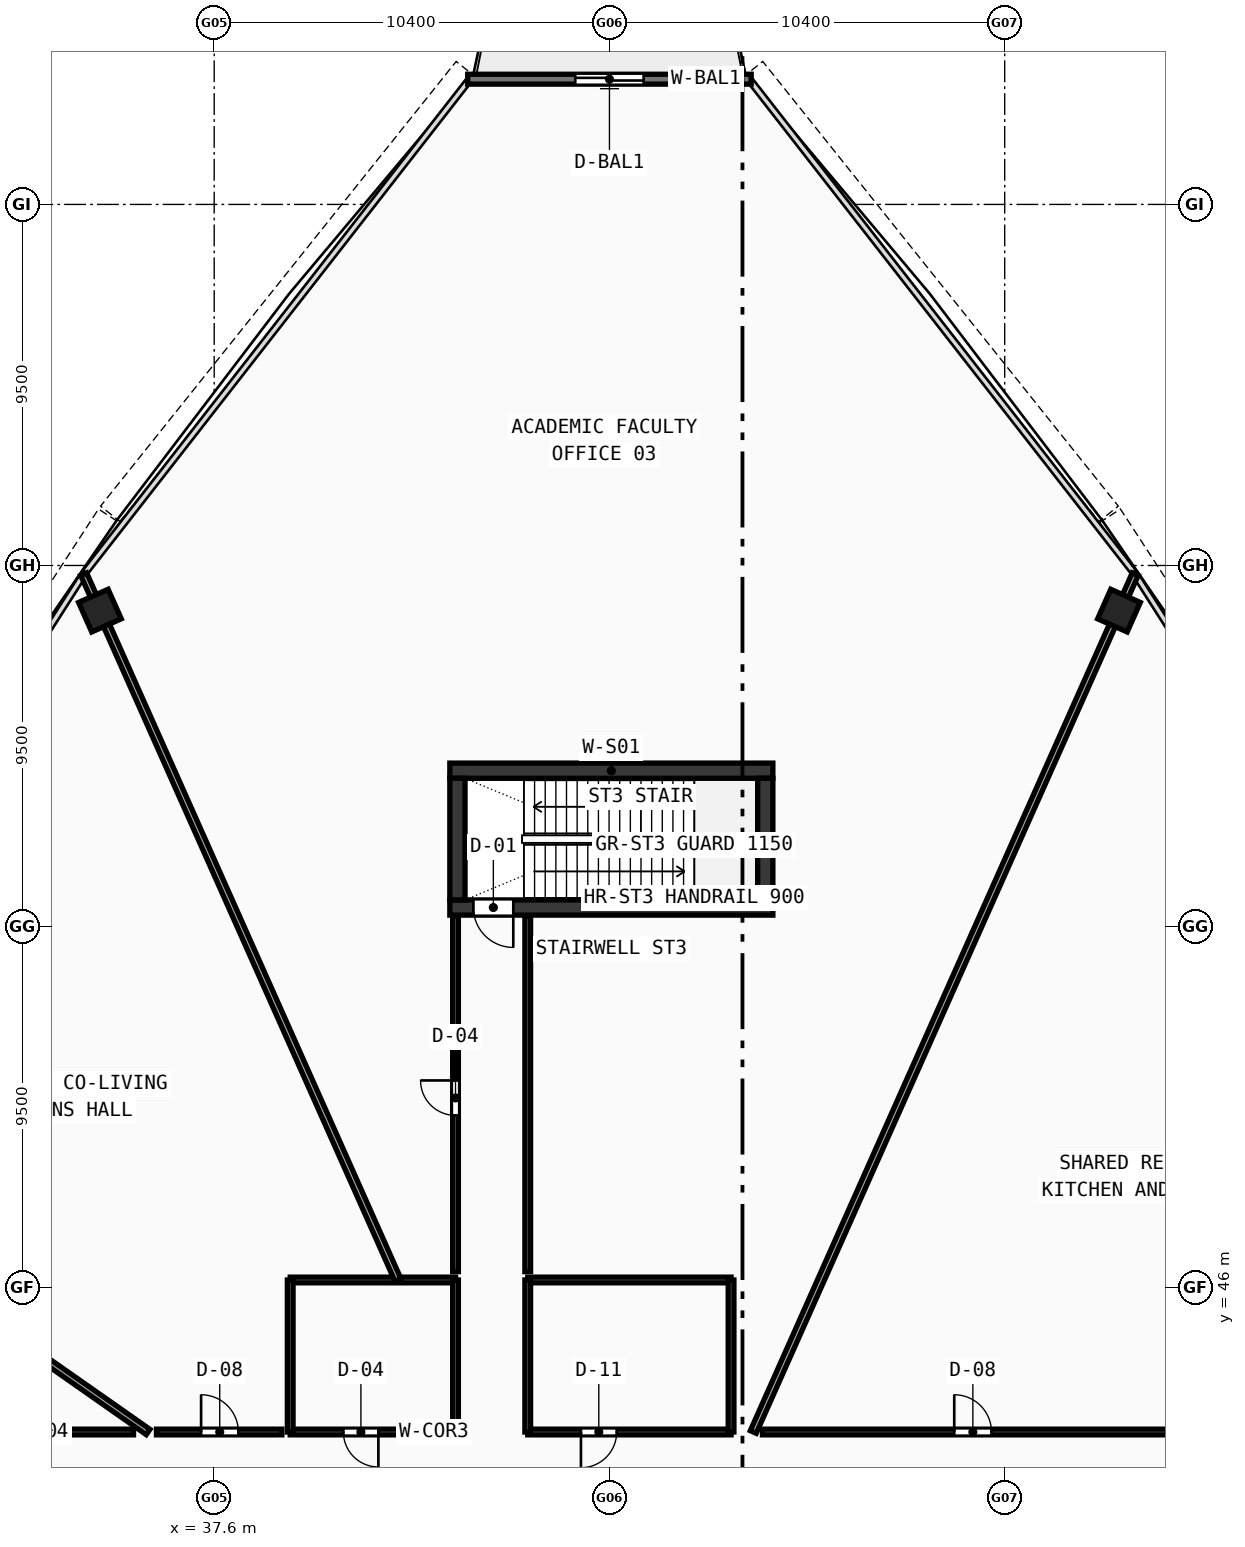
"""IFC4 building model, lengths in metres.
Left out: names, types, materials, properties, quantities, classifications, styles, units other than length and angle.
Written with IfcOpenShell. Run it as: python <this file> out.ifc"""

import sys

from ifc_helpers import new_model, si_unit, direction, frame, frame_2d, origin, origin_with_axes, origin_2d, place, context, subcontext, project, spatial, rectangle, hollow_rectangle, extrude, source, transform, mapped, element, fill, save


model = new_model("IFC4")
c1 = context("Model", 3, precision=1e-05, world=origin(), true_north=direction((0.0, 1.0)))
c2 = subcontext(c1, "Body", "Model", "MODEL_VIEW")
j1 = project(units=[si_unit("LENGTHUNIT", "METRE"), si_unit("PLANEANGLEUNIT", "RADIAN")], contexts=[c1])
p1 = place(None, origin())
s1 = spatial("IfcSite", under=j1, at=p1, CompositionType="ELEMENT")
p2 = place(p1, origin())
s2 = spatial("IfcBuilding", under=s1, at=p2, CompositionType="ELEMENT")
p3 = place(p2, frame((0.0, 0.0, 266.91)))
s3 = spatial("IfcBuildingStorey", under=s2, at=p3, CompositionType="ELEMENT", Elevation=266.91)
p4 = place(p3, frame((43.8, 59.6, 0.0), z_axis=(0.0, 0.0, 1.0), x_axis=(1.0, 0.0, 0.0)))
e1 = element("IfcWall", 1, at=p4, inside=s3, PredefinedType="SHEAR", context=c2, shape_type="SweptSolid", body=[
    extrude(rectangle(XDim=8.5, YDim=0.4, at=frame_2d((4.25, 0.0))), origin(), (0.0, 0.0, 1.0), 5.57),
])
p5 = place(p3, frame((43.8, 56.0, 0.0), z_axis=(0.0, 0.0, 1.0), x_axis=(1.0, 0.0, 0.0)))
e2 = element("IfcWall", 2, at=p5, inside=s3, PredefinedType="SHEAR", context=c2, shape_type="SweptSolid", body=[
    extrude(rectangle(XDim=8.5, YDim=0.4, at=frame_2d((4.25, 0.0))), origin(), (0.0, 0.0, 1.0), 5.57),
])
p6 = place(p5, frame((0.62, 0.0, 0.0)))
e3 = element("IfcOpeningElement", 3, at=p6, cuts=e2, PredefinedType="OPENING", context=c2, shape_type="SweptSolid", body=[
    extrude(rectangle(XDim=1.05, YDim=2.1, at=frame_2d((0.525, 1.05))), frame((0.0, 0.21, 0.0), z_axis=(0.0, -1.0, 0.0), x_axis=(1.0, 0.0, 0.0)), (0.0, 0.0, 1.0), 0.42),
])
for number, where, z_axis, x_axis in (
    (4, (44.0, 56.2, 0.0), (0.0, 0.0, 1.0), (0.0, 1.0, 0.0)),
    (5, (52.1, 56.2, 0.0), (0.0, 0.0, 1.0), (0.0, 1.0, 0.0)),
):
    element("IfcWall", number, at=place(p3, frame(where, z_axis=z_axis, x_axis=x_axis)), inside=s3, PredefinedType="SHEAR", context=c2, shape_type="SweptSolid", body=[
        extrude(rectangle(XDim=3.2, YDim=0.4, at=frame_2d((1.6, 0.0))), origin(), (0.0, 0.0, 1.0), 5.57),
    ])
m1 = source(origin(), c2, "Body", "SweptSolid", [
    extrude(hollow_rectangle(XDim=0.85, YDim=0.85, WallThickness=0.034, at=origin_2d()), origin(), (0.0, 0.0, 1.0), 5.83),
])
for number, where, z_axis, x_axis in (
    (6, (61.407, 63.812, -0.26), (0.0, 0.0, 1.0), (-0.914, 0.407, 0.0)),
    (7, (34.593, 63.812, -0.26), (0.0, 0.0, 1.0), (-0.914, -0.407, 0.0)),
):
    element("IfcColumn", number, at=place(p3, frame(where, z_axis=z_axis, x_axis=x_axis)), inside=s3, PredefinedType="COLUMN", context=c2, shape_type="MappedRepresentation", body=[
        mapped(m1, transform((0.0, 0.0, 0.0), scale=1.0)),
    ])
p7 = place(p3, frame((51.729, 77.795, 0.0), z_axis=(0.0, 0.0, 1.0), x_axis=(-1.0, 0.0, 0.0)))
e8 = element("IfcWall", 8, at=p7, inside=s3, PredefinedType="STANDARD", context=c2, shape_type="SweptSolid", body=[
    extrude(rectangle(XDim=7.458, YDim=0.26, at=frame_2d((3.729, 0.0))), origin(), (0.0, 0.0, 1.0), 5.57),
])
p8 = place(p7, frame((2.829, 0.0, 0.0)))
e9 = element("IfcOpeningElement", 9, at=p8, cuts=e8, PredefinedType="OPENING", context=c2, shape_type="SweptSolid", body=[
    extrude(rectangle(XDim=1.8, YDim=2.15, at=frame_2d((0.9, 1.075))), frame((0.0, 0.14, 0.0), z_axis=(0.0, -1.0, 0.0), x_axis=(1.0, 0.0, 0.0)), (0.0, 0.0, 1.0), 0.28),
])
p9 = place(p3, frame((39.6, 42.2, 0.0), z_axis=(0.0, 0.0, 1.0), x_axis=(1.0, 0.0, 0.0)))
e10 = element("IfcWall", 10, at=p9, inside=s3, PredefinedType="PARTITIONING", context=c2, shape_type="SweptSolid", body=[
    extrude(rectangle(XDim=4.35, YDim=0.15, at=frame_2d((2.175, 0.0))), origin(), (0.0, 0.0, 1.0), 2.22),
])
p10 = place(p9, frame((1.4, 0.0, 0.0)))
e11 = element("IfcOpeningElement", 11, at=p10, cuts=e10, PredefinedType="OPENING", context=c2, shape_type="SweptSolid", body=[
    extrude(rectangle(XDim=0.92, YDim=2.1, at=frame_2d((0.46, 1.05))), frame((0.0, 0.085, 0.0), z_axis=(0.0, -1.0, 0.0), x_axis=(1.0, 0.0, 0.0)), (0.0, 0.0, 1.0), 0.17),
])
p11 = place(p3, frame((39.6, 46.2, 0.0), z_axis=(0.0, 0.0, 1.0), x_axis=(1.0, 0.0, 0.0)))
e12 = element("IfcWall", 12, at=p11, inside=s3, PredefinedType="PARTITIONING", context=c2, shape_type="SweptSolid", body=[
    extrude(rectangle(XDim=4.35, YDim=0.15, at=frame_2d((2.175, 0.0))), origin(), (0.0, 0.0, 1.0), 2.22),
])
p12 = place(p3, frame((39.6, 42.2, 0.0), z_axis=(0.0, 0.0, 1.0), x_axis=(0.0, 1.0, 0.0)))
e13 = element("IfcWall", 13, at=p12, inside=s3, PredefinedType="PARTITIONING", context=c2, shape_type="SweptSolid", body=[
    extrude(rectangle(XDim=4.0, YDim=0.15, at=frame_2d((2.0, 0.0))), origin(), (0.0, 0.0, 1.0), 5.22),
])
p13 = place(p3, frame((43.95, 42.2, 0.0), z_axis=(0.0, 0.0, 1.0), x_axis=(0.0, 1.0, 0.0)))
e14 = element("IfcWall", 14, at=p13, inside=s3, PredefinedType="PARTITIONING", context=c2, shape_type="SweptSolid", body=[
    extrude(rectangle(XDim=4.0, YDim=0.15, at=frame_2d((2.0, 0.0))), origin(), (0.0, 0.0, 1.0), 2.22),
])
p14 = place(p3, frame((45.85, 42.2, 0.0), z_axis=(0.0, 0.0, 1.0), x_axis=(1.0, 0.0, 0.0)))
e15 = element("IfcWall", 15, at=p14, inside=s3, PredefinedType="PARTITIONING", context=c2, shape_type="SweptSolid", body=[
    extrude(rectangle(XDim=5.35, YDim=0.15, at=frame_2d((2.675, 0.0))), origin(), (0.0, 0.0, 1.0), 5.57),
])
p15 = place(p14, frame((1.4, 0.0, 0.0)))
e16 = element("IfcOpeningElement", 16, at=p15, cuts=e15, PredefinedType="OPENING", context=c2, shape_type="SweptSolid", body=[
    extrude(rectangle(XDim=0.94, YDim=2.1, at=frame_2d((0.47, 1.05))), frame((0.0, 0.085, 0.0), z_axis=(0.0, -1.0, 0.0), x_axis=(1.0, 0.0, 0.0)), (0.0, 0.0, 1.0), 0.17),
])
p16 = place(p3, frame((45.85, 46.2, 0.0), z_axis=(0.0, 0.0, 1.0), x_axis=(1.0, 0.0, 0.0)))
e17 = element("IfcWall", 17, at=p16, inside=s3, PredefinedType="PARTITIONING", context=c2, shape_type="SweptSolid", body=[
    extrude(rectangle(XDim=5.35, YDim=0.15, at=frame_2d((2.675, 0.0))), origin(), (0.0, 0.0, 1.0), 5.57),
])
for number, where, z_axis, x_axis in (
    (18, (45.85, 42.2, 0.0), (0.0, 0.0, 1.0), (0.0, 1.0, 0.0)),
    (19, (51.2, 42.2, 0.0), (0.0, 0.0, 1.0), (0.0, 1.0, 0.0)),
):
    element("IfcWall", number, at=place(p3, frame(where, z_axis=z_axis, x_axis=x_axis)), inside=s3, PredefinedType="PARTITIONING", context=c2, shape_type="SweptSolid", body=[
        extrude(rectangle(XDim=4.0, YDim=0.15, at=frame_2d((2.0, 0.0))), origin(), (0.0, 0.0, 1.0), 5.57),
    ])
p17 = place(p3, frame((51.784, 42.2, 0.0), z_axis=(0.0, 0.0, 1.0), x_axis=(0.406737985753, 0.913544859843, 0.0)))
e20 = element("IfcWall", 20, at=p17, inside=s3, PredefinedType="PARTITIONING", context=c2, shape_type="SweptSolid", body=[
    extrude(rectangle(XDim=24.707, YDim=0.17, at=frame_2d((12.354, 0.0))), origin(), (0.0, 0.0, 1.0), 2.22),
])
p18 = place(p3, frame((42.435, 46.2, 0.0), z_axis=(0.0, 0.0, 1.0), x_axis=(-0.406734534197, 0.913546396573, 0.0)))
e21 = element("IfcWall", 21, at=p18, inside=s3, PredefinedType="PARTITIONING", context=c2, shape_type="SweptSolid", body=[
    extrude(rectangle(XDim=20.329, YDim=0.17, at=frame_2d((10.164, 0.0))), origin(), (0.0, 0.0, 1.0), 2.22),
])
p19 = place(p3, frame((35.861, 42.2, 0.0), z_axis=(0.0, 0.0, 1.0), x_axis=(-0.819147381932, 0.57358309483, 0.0)))
e22 = element("IfcWall", 22, at=p19, inside=s3, PredefinedType="PARTITIONING", context=c2, shape_type="SweptSolid", body=[
    extrude(rectangle(XDim=13.297, YDim=0.17, at=frame_2d((6.649, 0.0))), origin(), (0.0, 0.0, 1.0), 4.92),
])
p20 = place(p3, frame((33.15, 42.2, 0.0), z_axis=(0.0, 0.0, 1.0), x_axis=(1.0, 0.0, 0.0)))
e23 = element("IfcWall", 23, at=p20, inside=s3, PredefinedType="PARTITIONING", context=c2, shape_type="SweptSolid", body=[
    extrude(rectangle(XDim=2.327, YDim=0.15, at=frame_2d((1.164, 0.0))), origin(), (0.0, 0.0, 1.0), 5.22),
])
p21 = place(p3, frame((36.081, 42.2, 0.0), z_axis=(0.0, 0.0, 1.0), x_axis=(1.0, 0.0, 0.0)))
e24 = element("IfcWall", 24, at=p21, inside=s3, PredefinedType="PARTITIONING", context=c2, shape_type="SweptSolid", body=[
    extrude(rectangle(XDim=3.299, YDim=0.15, at=frame_2d((1.65, 0.0))), origin(), (0.0, 0.0, 1.0), 2.22),
])
p22 = place(p21, frame((1.175, 0.0, 0.0)))
e25 = element("IfcOpeningElement", 25, at=p22, cuts=e24, PredefinedType="OPENING", context=c2, shape_type="SweptSolid", body=[
    extrude(rectangle(XDim=0.98, YDim=2.12, at=frame_2d((0.49, 1.06))), frame((0.0, 0.085, 0.0), z_axis=(0.0, -1.0, 0.0), x_axis=(1.0, 0.0, 0.0)), (0.0, 0.0, 1.0), 0.17),
])
p23 = place(p3, frame((43.95, 46.42, 0.0), z_axis=(0.0, 0.0, 1.0), x_axis=(0.0, 1.0, 0.0)))
e26 = element("IfcWall", 26, at=p23, inside=s3, PredefinedType="PARTITIONING", context=c2, shape_type="SweptSolid", body=[
    extrude(rectangle(XDim=9.36, YDim=0.15, at=frame_2d((4.68, 0.0))), origin(), (0.0, 0.0, 1.0), 5.22),
])
p24 = place(p23, frame((4.11, 0.0, 0.0)))
e27 = element("IfcOpeningElement", 27, at=p24, cuts=e26, PredefinedType="OPENING", context=c2, shape_type="SweptSolid", body=[
    extrude(rectangle(XDim=0.92, YDim=2.1, at=frame_2d((0.46, 1.05))), frame((0.0, 0.085, 0.0), z_axis=(0.0, -1.0, 0.0), x_axis=(1.0, 0.0, 0.0)), (0.0, 0.0, 1.0), 0.17),
])
p25 = place(p3, frame((45.85, 55.78, 0.0), z_axis=(0.0, 0.0, 1.0), x_axis=(0.0, -1.0, 0.0)))
e28 = element("IfcWall", 28, at=p25, inside=s3, PredefinedType="PARTITIONING", context=c2, shape_type="SweptSolid", body=[
    extrude(rectangle(XDim=9.36, YDim=0.15, at=frame_2d((4.68, 0.0))), origin(), (0.0, 0.0, 1.0), 5.22),
])
p26 = place(p3, frame((52.025, 42.2, 0.0), z_axis=(0.0, 0.0, 1.0), x_axis=(1.0, 0.0, 0.0)))
e29 = element("IfcWall", 29, at=p26, inside=s3, PredefinedType="PARTITIONING", context=c2, shape_type="SweptSolid", body=[
    extrude(rectangle(XDim=10.825, YDim=0.15, at=frame_2d((5.413, 0.0))), origin(), (0.0, 0.0, 1.0), 2.22),
])
p27 = place(p26, frame((5.047, 0.0, 0.0)))
e30 = element("IfcOpeningElement", 30, at=p27, cuts=e29, PredefinedType="OPENING", context=c2, shape_type="SweptSolid", body=[
    extrude(rectangle(XDim=0.98, YDim=2.12, at=frame_2d((0.49, 1.06))), frame((0.0, 0.085, 0.0), z_axis=(0.0, -1.0, 0.0), x_axis=(1.0, 0.0, 0.0)), (0.0, 0.0, 1.0), 0.17),
])
m2 = source(origin(), c2, "Body", "SweptSolid", [
    extrude(rectangle(XDim=1.8, YDim=2.15, at=frame_2d((0.9, 1.075))), frame((0.0, 0.025, 0.0), z_axis=(0.0, -1.0, 0.0), x_axis=(1.0, 0.0, 0.0)), (0.0, 0.0, 1.0), 0.05),
])
p28 = place(p8, origin_with_axes())
e31 = element("IfcDoor", 31, at=p28, inside=s3, OperationType="DOUBLE_DOOR_SLIDING", PredefinedType="DOOR", context=c2, shape_type="MappedRepresentation", body=[
    mapped(m2, transform((0.0, 0.0, 0.0), scale=1.0)),
])
fill(e9, e31)
m3 = source(origin(), c2, "Body", "SweptSolid", [
    extrude(rectangle(XDim=1.05, YDim=2.1, at=frame_2d((0.525, 1.05))), frame((0.0, 0.025, 0.0), z_axis=(0.0, -1.0, 0.0), x_axis=(1.0, 0.0, 0.0)), (0.0, 0.0, 1.0), 0.05),
])
p29 = place(p6, frame((1.05, 0.0, 0.0), z_axis=(0.0, 0.0, 1.0), x_axis=(-1.0, 0.0, 0.0)))
e32 = element("IfcDoor", 32, at=p29, inside=s3, OperationType="SINGLE_SWING_LEFT", PredefinedType="DOOR", context=c2, shape_type="MappedRepresentation", body=[
    mapped(m3, transform((0.0, 0.0, 0.0), scale=1.0)),
])
fill(e3, e32)
m4 = source(origin(), c2, "Body", "SweptSolid", [
    extrude(rectangle(XDim=0.92, YDim=2.1, at=frame_2d((0.46, 1.05))), frame((0.0, 0.025, 0.0), z_axis=(0.0, -1.0, 0.0), x_axis=(1.0, 0.0, 0.0)), (0.0, 0.0, 1.0), 0.05),
])
p30 = place(p10, frame((0.92, 0.0, 0.0), z_axis=(0.0, 0.0, 1.0), x_axis=(-1.0, 0.0, 0.0)))
e33 = element("IfcDoor", 33, at=p30, inside=s3, OperationType="SINGLE_SWING_LEFT", PredefinedType="DOOR", context=c2, shape_type="MappedRepresentation", body=[
    mapped(m4, transform((0.0, 0.0, 0.0), scale=1.0)),
])
fill(e11, e33)
m5 = source(origin(), c2, "Body", "SweptSolid", [
    extrude(rectangle(XDim=0.94, YDim=2.1, at=frame_2d((0.47, 1.05))), frame((0.0, 0.025, 0.0), z_axis=(0.0, -1.0, 0.0), x_axis=(1.0, 0.0, 0.0)), (0.0, 0.0, 1.0), 0.05),
])
p31 = place(p15, frame((0.94, 0.0, 0.0), z_axis=(0.0, 0.0, 1.0), x_axis=(-1.0, 0.0, 0.0)))
e34 = element("IfcDoor", 34, at=p31, inside=s3, OperationType="SINGLE_SWING_RIGHT", PredefinedType="DOOR", context=c2, shape_type="MappedRepresentation", body=[
    mapped(m5, transform((0.0, 0.0, 0.0), scale=1.0)),
])
fill(e16, e34)
m6 = source(origin(), c2, "Body", "SweptSolid", [
    extrude(rectangle(XDim=0.98, YDim=2.12, at=frame_2d((0.49, 1.06))), frame((0.0, 0.025, 0.0), z_axis=(0.0, -1.0, 0.0), x_axis=(1.0, 0.0, 0.0)), (0.0, 0.0, 1.0), 0.05),
])
p32 = place(p27, origin_with_axes())
e35 = element("IfcDoor", 35, at=p32, inside=s3, OperationType="SINGLE_SWING_LEFT", PredefinedType="DOOR", context=c2, shape_type="MappedRepresentation", body=[
    mapped(m6, transform((0.0, 0.0, 0.0), scale=1.0)),
])
fill(e30, e35)
p33 = place(p24, origin_with_axes())
e36 = element("IfcDoor", 36, at=p33, inside=s3, OperationType="SINGLE_SWING_RIGHT", PredefinedType="DOOR", context=c2, shape_type="MappedRepresentation", body=[
    mapped(m4, transform((0.0, 0.0, 0.0), scale=1.0)),
])
fill(e27, e36)
p34 = place(p22, origin_with_axes())
e37 = element("IfcDoor", 37, at=p34, inside=s3, OperationType="SINGLE_SWING_LEFT", PredefinedType="DOOR", context=c2, shape_type="MappedRepresentation", body=[
    mapped(m6, transform((0.0, 0.0, 0.0), scale=1.0)),
])
fill(e25, e37)
save(model, sys.argv[1])
